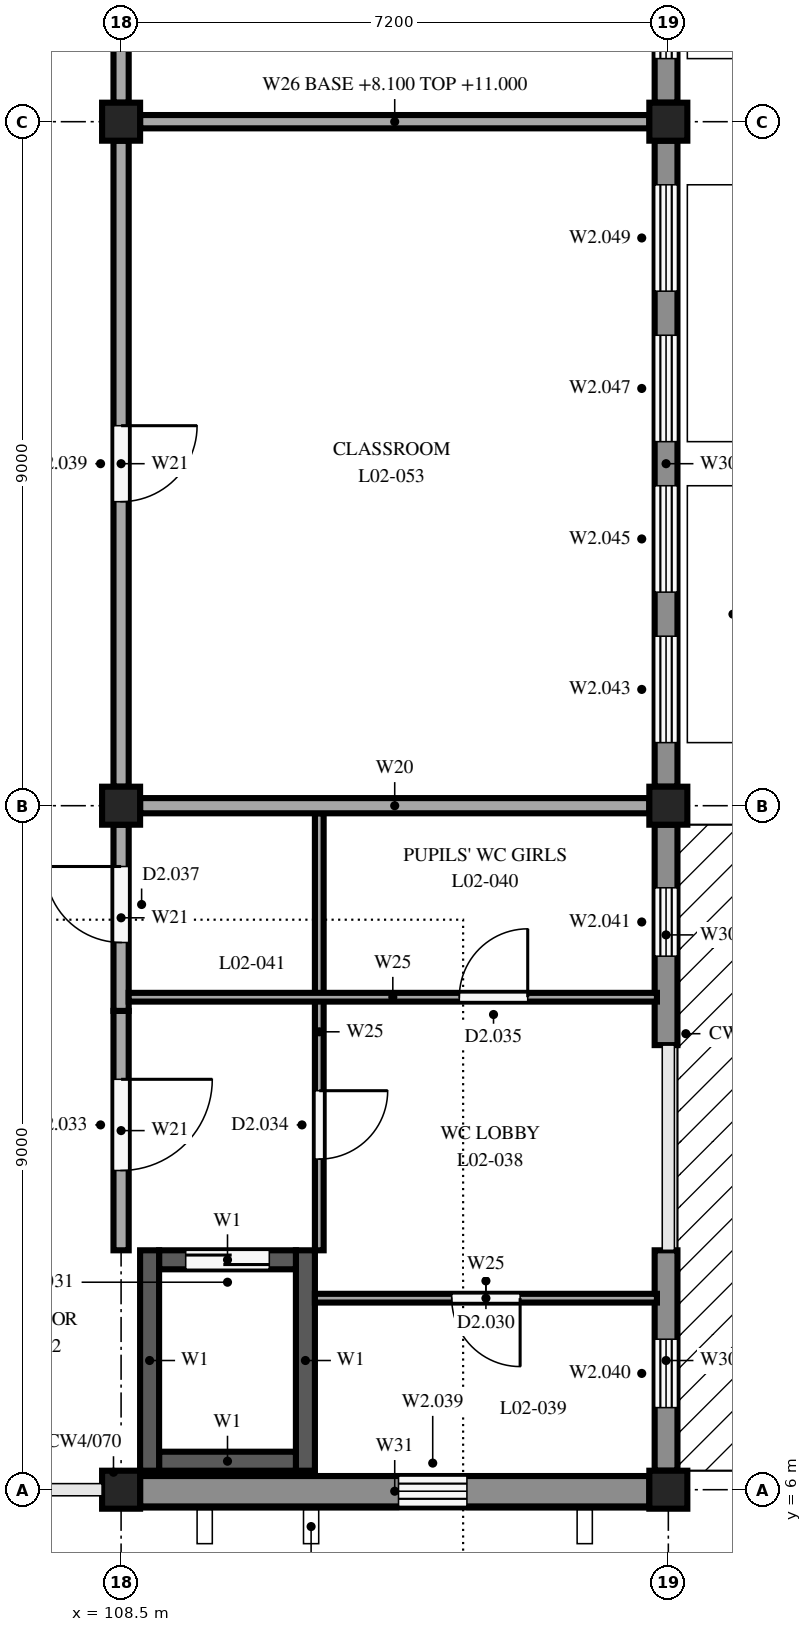
"""IFC4 building model, lengths in metres.
Left out: names, types, materials, properties, quantities, classifications, styles, units other than length and angle.
Written with IfcOpenShell. Run it as: python <this file> out.ifc"""

import sys

from ifc_helpers import new_model, si_unit, direction, frame, frame_2d, origin, origin_2d, place, context, subcontext, project, spatial, rectangle, extrude, element, fill, save


model = new_model("IFC4")
c1 = context("Model", 3, precision=1e-05, world=origin(), true_north=direction((0.0, 1.0)))
c2 = subcontext(c1, "Body", "Model", "MODEL_VIEW")
j1 = project(units=[si_unit("LENGTHUNIT", "METRE"), si_unit("PLANEANGLEUNIT", "RADIAN")], contexts=[c1])
p1 = place(None, origin())
s1 = spatial("IfcSite", under=j1, at=p1, CompositionType="ELEMENT")
p2 = place(p1, origin())
s2 = spatial("IfcBuilding", under=s1, at=p2, CompositionType="ELEMENT")
p3 = place(p2, frame((0.0, 0.0, 8.1)))
s3 = spatial("IfcBuildingStorey", under=s2, at=p3, CompositionType="ELEMENT", Elevation=8.1)
for number, where, z_axis, x_axis in (
    (1, (108.5, 6.0, 0.0), (0.0, 0.0, 1.0), (1.0, 0.0, 0.0)),
    (2, (108.5, 15.0, 0.0), (0.0, 0.0, 1.0), (1.0, 0.0, 0.0)),
    (3, (108.5, 24.0, 0.0), (0.0, 0.0, 1.0), (1.0, 0.0, 0.0)),
    (4, (115.7, 6.0, 0.0), (0.0, 0.0, 1.0), (1.0, 0.0, 0.0)),
    (5, (115.7, 15.0, 0.0), (0.0, 0.0, 1.0), (1.0, 0.0, 0.0)),
    (6, (115.7, 24.0, 0.0), (0.0, 0.0, 1.0), (1.0, 0.0, 0.0)),
):
    element("IfcColumn", number, at=place(p3, frame(where, z_axis=z_axis, x_axis=x_axis)), inside=s3, PredefinedType="COLUMN", context=c2, shape_type="SweptSolid", body=[
        extrude(rectangle(XDim=0.5, YDim=0.5, at=origin_2d()), origin(), (0.0, 0.0, 1.0), 3.35),
    ])
for number, where, z_axis, x_axis in (
    (7, (108.875, 6.25, 0.0), (0.0, 0.0, 1.0), (0.0, 1.0, 0.0)),
    (8, (110.925, 6.25, 0.0), (0.0, 0.0, 1.0), (0.0, 1.0, 0.0)),
):
    element("IfcWall", number, at=place(p3, frame(where, z_axis=z_axis, x_axis=x_axis)), inside=s3, PredefinedType="SHEAR", context=c2, shape_type="SweptSolid", body=[
        extrude(rectangle(XDim=2.9, YDim=0.25, at=frame_2d((1.45, 0.0))), origin(), (0.0, 0.0, 1.0), 3.35),
    ])
p4 = place(p3, frame((109.0, 6.375, 0.0), z_axis=(0.0, 0.0, 1.0), x_axis=(1.0, 0.0, 0.0)))
e9 = element("IfcWall", 9, at=p4, inside=s3, PredefinedType="SHEAR", context=c2, shape_type="SweptSolid", body=[
    extrude(rectangle(XDim=1.8, YDim=0.25, at=frame_2d((0.9, 0.0))), origin(), (0.0, 0.0, 1.0), 3.35),
])
p5 = place(p3, frame((109.0, 9.025, 0.0), z_axis=(0.0, 0.0, 1.0), x_axis=(1.0, 0.0, 0.0)))
e10 = element("IfcWall", 10, at=p5, inside=s3, PredefinedType="SHEAR", context=c2, shape_type="SweptSolid", body=[
    extrude(rectangle(XDim=1.8, YDim=0.25, at=frame_2d((0.9, 0.0))), origin(), (0.0, 0.0, 1.0), 3.35),
])
p6 = place(p5, frame((0.35, 0.0, 0.0)))
e11 = element("IfcOpeningElement", 11, at=p6, cuts=e10, PredefinedType="OPENING", context=c2, shape_type="SweptSolid", body=[
    extrude(rectangle(XDim=1.1, YDim=2.1, at=frame_2d((0.55, 1.05))), frame((0.0, 0.135, 0.0), z_axis=(0.0, -1.0, 0.0), x_axis=(1.0, 0.0, 0.0)), (0.0, 0.0, 1.0), 0.27),
])
p7 = place(p3, frame((115.67, 9.15, 0.0), z_axis=(0.0, 0.0, 1.0), x_axis=(0.0, -1.0, 0.0)))
e12 = element("IfcWall", 12, at=p7, inside=s3, PredefinedType="STANDARD", context=c2, shape_type="SweptSolid", body=[
    extrude(rectangle(XDim=2.9, YDim=0.3, at=frame_2d((1.45, 0.0))), origin(), (0.0, 0.0, 1.0), 2.85),
])
p8 = place(p7, frame((1.17, 0.0, 1.6)))
e13 = element("IfcOpeningElement", 13, at=p8, cuts=e12, PredefinedType="OPENING", context=c2, shape_type="SweptSolid", body=[
    extrude(rectangle(XDim=0.9, YDim=1.0, at=frame_2d((0.45, 0.5))), frame((0.0, 0.16, 0.0), z_axis=(0.0, -1.0, 0.0), x_axis=(1.0, 0.0, 0.0)), (0.0, 0.0, 1.0), 0.32),
])
p9 = place(p3, frame((115.67, 14.75, 0.0), z_axis=(0.0, 0.0, 1.0), x_axis=(0.0, -1.0, 0.0)))
e14 = element("IfcWall", 14, at=p9, inside=s3, PredefinedType="STANDARD", context=c2, shape_type="SweptSolid", body=[
    extrude(rectangle(XDim=2.9, YDim=0.3, at=frame_2d((1.45, 0.0))), origin(), (0.0, 0.0, 1.0), 2.85),
])
p10 = place(p9, frame((0.83, 0.0, 1.6)))
e15 = element("IfcOpeningElement", 15, at=p10, cuts=e14, PredefinedType="OPENING", context=c2, shape_type="SweptSolid", body=[
    extrude(rectangle(XDim=0.9, YDim=1.0, at=frame_2d((0.45, 0.5))), frame((0.0, 0.16, 0.0), z_axis=(0.0, -1.0, 0.0), x_axis=(1.0, 0.0, 0.0)), (0.0, 0.0, 1.0), 0.32),
])
p11 = place(p3, frame((115.67, 23.75, 0.0), z_axis=(0.0, 0.0, 1.0), x_axis=(0.0, -1.0, 0.0)))
e16 = element("IfcWall", 16, at=p11, inside=s3, PredefinedType="STANDARD", context=c2, shape_type="SweptSolid", body=[
    extrude(rectangle(XDim=8.5, YDim=0.3, at=frame_2d((4.25, 0.0))), origin(), (0.0, 0.0, 1.0), 2.85),
])
p12 = place(p11, frame((6.52, 0.0, 0.6)))
e17 = element("IfcOpeningElement", 17, at=p12, cuts=e16, PredefinedType="OPENING", context=c2, shape_type="SweptSolid", body=[
    extrude(rectangle(XDim=1.4, YDim=2.2, at=frame_2d((0.7, 1.1))), frame((0.0, 0.16, 0.0), z_axis=(0.0, -1.0, 0.0), x_axis=(1.0, 0.0, 0.0)), (0.0, 0.0, 1.0), 0.32),
])
p13 = place(p11, frame((4.54, 0.0, 0.6)))
e18 = element("IfcOpeningElement", 18, at=p13, cuts=e16, PredefinedType="OPENING", context=c2, shape_type="SweptSolid", body=[
    extrude(rectangle(XDim=1.4, YDim=2.2, at=frame_2d((0.7, 1.1))), frame((0.0, 0.16, 0.0), z_axis=(0.0, -1.0, 0.0), x_axis=(1.0, 0.0, 0.0)), (0.0, 0.0, 1.0), 0.32),
])
p14 = place(p11, frame((2.56, 0.0, 0.6)))
e19 = element("IfcOpeningElement", 19, at=p14, cuts=e16, PredefinedType="OPENING", context=c2, shape_type="SweptSolid", body=[
    extrude(rectangle(XDim=1.4, YDim=2.2, at=frame_2d((0.7, 1.1))), frame((0.0, 0.16, 0.0), z_axis=(0.0, -1.0, 0.0), x_axis=(1.0, 0.0, 0.0)), (0.0, 0.0, 1.0), 0.32),
])
p15 = place(p11, frame((0.58, 0.0, 0.6)))
e20 = element("IfcOpeningElement", 20, at=p15, cuts=e16, PredefinedType="OPENING", context=c2, shape_type="SweptSolid", body=[
    extrude(rectangle(XDim=1.4, YDim=2.2, at=frame_2d((0.7, 1.1))), frame((0.0, 0.16, 0.0), z_axis=(0.0, -1.0, 0.0), x_axis=(1.0, 0.0, 0.0)), (0.0, 0.0, 1.0), 0.32),
])
p16 = place(p3, frame((115.67, 32.75, 0.0), z_axis=(0.0, 0.0, 1.0), x_axis=(0.0, -1.0, 0.0)))
e21 = element("IfcWall", 21, at=p16, inside=s3, PredefinedType="STANDARD", context=c2, shape_type="SweptSolid", body=[
    extrude(rectangle(XDim=8.5, YDim=0.3, at=frame_2d((4.25, 0.0))), origin(), (0.0, 0.0, 1.0), 2.85),
])
p17 = place(p16, frame((6.52, 0.0, 0.6)))
e22 = element("IfcOpeningElement", 22, at=p17, cuts=e21, PredefinedType="OPENING", context=c2, shape_type="SweptSolid", body=[
    extrude(rectangle(XDim=1.4, YDim=2.2, at=frame_2d((0.7, 1.1))), frame((0.0, 0.16, 0.0), z_axis=(0.0, -1.0, 0.0), x_axis=(1.0, 0.0, 0.0)), (0.0, 0.0, 1.0), 0.32),
])
p18 = place(p16, frame((4.54, 0.0, 0.6)))
e23 = element("IfcOpeningElement", 23, at=p18, cuts=e21, PredefinedType="OPENING", context=c2, shape_type="SweptSolid", body=[
    extrude(rectangle(XDim=1.4, YDim=2.2, at=frame_2d((0.7, 1.1))), frame((0.0, 0.16, 0.0), z_axis=(0.0, -1.0, 0.0), x_axis=(1.0, 0.0, 0.0)), (0.0, 0.0, 1.0), 0.32),
])
p19 = place(p16, frame((2.56, 0.0, 0.6)))
e24 = element("IfcOpeningElement", 24, at=p19, cuts=e21, PredefinedType="OPENING", context=c2, shape_type="SweptSolid", body=[
    extrude(rectangle(XDim=1.4, YDim=2.2, at=frame_2d((0.7, 1.1))), frame((0.0, 0.16, 0.0), z_axis=(0.0, -1.0, 0.0), x_axis=(1.0, 0.0, 0.0)), (0.0, 0.0, 1.0), 0.32),
])
p20 = place(p16, frame((0.58, 0.0, 0.6)))
e25 = element("IfcOpeningElement", 25, at=p20, cuts=e21, PredefinedType="OPENING", context=c2, shape_type="SweptSolid", body=[
    extrude(rectangle(XDim=1.4, YDim=2.2, at=frame_2d((0.7, 1.1))), frame((0.0, 0.16, 0.0), z_axis=(0.0, -1.0, 0.0), x_axis=(1.0, 0.0, 0.0)), (0.0, 0.0, 1.0), 0.32),
])
p21 = place(p3, frame((115.45, 5.98, 0.0), z_axis=(0.0, 0.0, 1.0), x_axis=(-1.0, 0.0, 0.0)))
e26 = element("IfcWall", 26, at=p21, inside=s3, PredefinedType="STANDARD", context=c2, shape_type="SweptSolid", body=[
    extrude(rectangle(XDim=6.7, YDim=0.4, at=frame_2d((3.35, 0.0))), origin(), (0.0, 0.0, 1.0), 2.9),
])
p22 = place(p21, frame((2.4, 0.0, 1.6)))
e27 = element("IfcOpeningElement", 27, at=p22, cuts=e26, PredefinedType="OPENING", context=c2, shape_type="SweptSolid", body=[
    extrude(rectangle(XDim=0.9, YDim=1.0, at=frame_2d((0.45, 0.5))), frame((0.0, 0.21, 0.0), z_axis=(0.0, -1.0, 0.0), x_axis=(1.0, 0.0, 0.0)), (0.0, 0.0, 1.0), 0.42),
])
p23 = place(p3, frame((108.5, 12.3, 0.0), z_axis=(0.0, 0.0, 1.0), x_axis=(0.0, -1.0, 0.0)))
e28 = element("IfcWall", 28, at=p23, inside=s3, PredefinedType="PARTITIONING", context=c2, shape_type="SweptSolid", body=[
    extrude(rectangle(XDim=3.15, YDim=0.2, at=frame_2d((1.575, 0.0))), origin(), (0.0, 0.0, 1.0), 2.9),
])
p24 = place(p23, frame((0.9, 0.0, 0.0)))
e29 = element("IfcOpeningElement", 29, at=p24, cuts=e28, PredefinedType="OPENING", context=c2, shape_type="SweptSolid", body=[
    extrude(rectangle(XDim=1.2, YDim=2.1, at=frame_2d((0.6, 1.05))), frame((0.0, 0.11, 0.0), z_axis=(0.0, -1.0, 0.0), x_axis=(1.0, 0.0, 0.0)), (0.0, 0.0, 1.0), 0.22),
])
p25 = place(p3, frame((108.5, 12.3, 0.0), z_axis=(0.0, 0.0, 1.0), x_axis=(0.0, 1.0, 0.0)))
e30 = element("IfcWall", 30, at=p25, inside=s3, PredefinedType="PARTITIONING", context=c2, shape_type="SweptSolid", body=[
    extrude(rectangle(XDim=2.45, YDim=0.2, at=frame_2d((1.225, 0.0))), origin(), (0.0, 0.0, 1.0), 2.9),
])
p26 = place(p25, frame((0.9, 0.0, 0.0)))
e31 = element("IfcOpeningElement", 31, at=p26, cuts=e30, PredefinedType="OPENING", context=c2, shape_type="SweptSolid", body=[
    extrude(rectangle(XDim=1.0, YDim=2.1, at=frame_2d((0.5, 1.05))), frame((0.0, 0.11, 0.0), z_axis=(0.0, -1.0, 0.0), x_axis=(1.0, 0.0, 0.0)), (0.0, 0.0, 1.0), 0.22),
])
p27 = place(p3, frame((108.75, 15.0, 0.0), z_axis=(0.0, 0.0, 1.0), x_axis=(1.0, 0.0, 0.0)))
e32 = element("IfcWall", 32, at=p27, inside=s3, PredefinedType="PARTITIONING", context=c2, shape_type="SweptSolid", body=[
    extrude(rectangle(XDim=6.7, YDim=0.2, at=frame_2d((3.35, 0.0))), origin(), (0.0, 0.0, 1.0), 2.9),
])
p28 = place(p3, frame((111.107, 14.9, 0.0), z_axis=(0.0, 0.0, 1.0), x_axis=(0.0, -1.0, 0.0)))
e33 = element("IfcWall", 33, at=p28, inside=s3, PredefinedType="PARTITIONING", context=c2, shape_type="SweptSolid", body=[
    extrude(rectangle(XDim=5.75, YDim=0.115, at=frame_2d((2.875, 0.0))), origin(), (0.0, 0.0, 1.0), 3.35),
])
p29 = place(p28, frame((3.65, 0.0, 0.0)))
e34 = element("IfcOpeningElement", 34, at=p29, cuts=e33, PredefinedType="OPENING", context=c2, shape_type="SweptSolid", body=[
    extrude(rectangle(XDim=0.9, YDim=2.1, at=frame_2d((0.45, 1.05))), frame((0.0, 0.067, 0.0), z_axis=(0.0, -1.0, 0.0), x_axis=(1.0, 0.0, 0.0)), (0.0, 0.0, 1.0), 0.135),
])
p30 = place(p3, frame((115.55, 8.52, 0.0), z_axis=(0.0, 0.0, 1.0), x_axis=(-1.0, 0.0, 0.0)))
e35 = element("IfcWall", 35, at=p30, inside=s3, PredefinedType="PARTITIONING", context=c2, shape_type="SweptSolid", body=[
    extrude(rectangle(XDim=4.5, YDim=0.115, at=frame_2d((2.25, 0.0))), origin(), (0.0, 0.0, 1.0), 3.35),
])
p31 = place(p30, frame((1.8, 0.0, 0.0)))
e36 = element("IfcOpeningElement", 36, at=p31, cuts=e35, PredefinedType="OPENING", context=c2, shape_type="SweptSolid", body=[
    extrude(rectangle(XDim=0.9, YDim=2.1, at=frame_2d((0.45, 1.05))), frame((0.0, 0.067, 0.0), z_axis=(0.0, -1.0, 0.0), x_axis=(1.0, 0.0, 0.0)), (0.0, 0.0, 1.0), 0.135),
])
p32 = place(p3, frame((108.6, 12.48, 0.0), z_axis=(0.0, 0.0, 1.0), x_axis=(1.0, 0.0, 0.0)))
e37 = element("IfcWall", 37, at=p32, inside=s3, PredefinedType="PARTITIONING", context=c2, shape_type="SweptSolid", body=[
    extrude(rectangle(XDim=6.95, YDim=0.115, at=frame_2d((3.475, 0.0))), origin(), (0.0, 0.0, 1.0), 3.35),
])
p33 = place(p32, frame((4.35, 0.0, 0.0)))
e38 = element("IfcOpeningElement", 38, at=p33, cuts=e37, PredefinedType="OPENING", context=c2, shape_type="SweptSolid", body=[
    extrude(rectangle(XDim=0.9, YDim=2.1, at=frame_2d((0.45, 1.05))), frame((0.0, 0.067, 0.0), z_axis=(0.0, -1.0, 0.0), x_axis=(1.0, 0.0, 0.0)), (0.0, 0.0, 1.0), 0.135),
])
p34 = place(p3, frame((108.5, 23.75, 0.0), z_axis=(0.0, 0.0, 1.0), x_axis=(0.0, -1.0, 0.0)))
e39 = element("IfcWall", 39, at=p34, inside=s3, PredefinedType="PARTITIONING", context=c2, shape_type="SweptSolid", body=[
    extrude(rectangle(XDim=8.5, YDim=0.2, at=frame_2d((4.25, 0.0))), origin(), (0.0, 0.0, 1.0), 2.9),
])
p35 = place(p34, frame((3.75, 0.0, 0.0)))
e40 = element("IfcOpeningElement", 40, at=p35, cuts=e39, PredefinedType="OPENING", context=c2, shape_type="SweptSolid", body=[
    extrude(rectangle(XDim=1.0, YDim=2.1, at=frame_2d((0.5, 1.05))), frame((0.0, 0.11, 0.0), z_axis=(0.0, -1.0, 0.0), x_axis=(1.0, 0.0, 0.0)), (0.0, 0.0, 1.0), 0.22),
])
p36 = place(p3, frame((108.5, 32.75, 0.0), z_axis=(0.0, 0.0, 1.0), x_axis=(0.0, -1.0, 0.0)))
e41 = element("IfcWall", 41, at=p36, inside=s3, PredefinedType="PARTITIONING", context=c2, shape_type="SweptSolid", body=[
    extrude(rectangle(XDim=8.5, YDim=0.2, at=frame_2d((4.25, 0.0))), origin(), (0.0, 0.0, 1.0), 2.9),
])
p37 = place(p36, frame((3.75, 0.0, 0.0)))
e42 = element("IfcOpeningElement", 42, at=p37, cuts=e41, PredefinedType="OPENING", context=c2, shape_type="SweptSolid", body=[
    extrude(rectangle(XDim=1.0, YDim=2.1, at=frame_2d((0.5, 1.05))), frame((0.0, 0.11, 0.0), z_axis=(0.0, -1.0, 0.0), x_axis=(1.0, 0.0, 0.0)), (0.0, 0.0, 1.0), 0.22),
])
p38 = place(p3, frame((108.75, 24.0, 0.0), z_axis=(0.0, 0.0, 1.0), x_axis=(1.0, 0.0, 0.0)))
e43 = element("IfcWall", 43, at=p38, inside=s3, PredefinedType="PARTITIONING", context=c2, shape_type="SweptSolid", body=[
    extrude(rectangle(XDim=6.7, YDim=0.175, at=frame_2d((3.35, 0.0))), origin(), (0.0, 0.0, 1.0), 2.9),
])
p39 = place(p8, origin())
e44 = element("IfcWindow", 44, at=p39, inside=s3, PartitioningType="SINGLE_PANEL", PredefinedType="WINDOW", context=c2, shape_type="SweptSolid", body=[
    extrude(rectangle(XDim=0.9, YDim=1.0, at=frame_2d((0.45, 0.5))), frame((0.0, 0.03, 0.0), z_axis=(0.0, -1.0, 0.0), x_axis=(1.0, 0.0, 0.0)), (0.0, 0.0, 1.0), 0.06),
])
fill(e13, e44)
p40 = place(p10, origin())
e45 = element("IfcWindow", 45, at=p40, inside=s3, PartitioningType="SINGLE_PANEL", PredefinedType="WINDOW", context=c2, shape_type="SweptSolid", body=[
    extrude(rectangle(XDim=0.9, YDim=1.0, at=frame_2d((0.45, 0.5))), frame((0.0, 0.03, 0.0), z_axis=(0.0, -1.0, 0.0), x_axis=(1.0, 0.0, 0.0)), (0.0, 0.0, 1.0), 0.06),
])
fill(e15, e45)
p41 = place(p12, origin())
e46 = element("IfcWindow", 46, at=p41, inside=s3, PartitioningType="DOUBLE_PANEL_VERTICAL", PredefinedType="WINDOW", context=c2, shape_type="SweptSolid", body=[
    extrude(rectangle(XDim=1.4, YDim=2.2, at=frame_2d((0.7, 1.1))), frame((0.0, 0.03, 0.0), z_axis=(0.0, -1.0, 0.0), x_axis=(1.0, 0.0, 0.0)), (0.0, 0.0, 1.0), 0.06),
])
fill(e17, e46)
p42 = place(p13, origin())
e47 = element("IfcWindow", 47, at=p42, inside=s3, PartitioningType="DOUBLE_PANEL_VERTICAL", PredefinedType="WINDOW", context=c2, shape_type="SweptSolid", body=[
    extrude(rectangle(XDim=1.4, YDim=2.2, at=frame_2d((0.7, 1.1))), frame((0.0, 0.03, 0.0), z_axis=(0.0, -1.0, 0.0), x_axis=(1.0, 0.0, 0.0)), (0.0, 0.0, 1.0), 0.06),
])
fill(e18, e47)
p43 = place(p14, origin())
e48 = element("IfcWindow", 48, at=p43, inside=s3, PartitioningType="DOUBLE_PANEL_VERTICAL", PredefinedType="WINDOW", context=c2, shape_type="SweptSolid", body=[
    extrude(rectangle(XDim=1.4, YDim=2.2, at=frame_2d((0.7, 1.1))), frame((0.0, 0.03, 0.0), z_axis=(0.0, -1.0, 0.0), x_axis=(1.0, 0.0, 0.0)), (0.0, 0.0, 1.0), 0.06),
])
fill(e19, e48)
p44 = place(p15, origin())
e49 = element("IfcWindow", 49, at=p44, inside=s3, PartitioningType="DOUBLE_PANEL_VERTICAL", PredefinedType="WINDOW", context=c2, shape_type="SweptSolid", body=[
    extrude(rectangle(XDim=1.4, YDim=2.2, at=frame_2d((0.7, 1.1))), frame((0.0, 0.03, 0.0), z_axis=(0.0, -1.0, 0.0), x_axis=(1.0, 0.0, 0.0)), (0.0, 0.0, 1.0), 0.06),
])
fill(e20, e49)
p45 = place(p17, origin())
e50 = element("IfcWindow", 50, at=p45, inside=s3, PartitioningType="DOUBLE_PANEL_VERTICAL", PredefinedType="WINDOW", context=c2, shape_type="SweptSolid", body=[
    extrude(rectangle(XDim=1.4, YDim=2.2, at=frame_2d((0.7, 1.1))), frame((0.0, 0.03, 0.0), z_axis=(0.0, -1.0, 0.0), x_axis=(1.0, 0.0, 0.0)), (0.0, 0.0, 1.0), 0.06),
])
fill(e22, e50)
p46 = place(p22, origin())
e51 = element("IfcWindow", 51, at=p46, inside=s3, PartitioningType="SINGLE_PANEL", PredefinedType="WINDOW", context=c2, shape_type="SweptSolid", body=[
    extrude(rectangle(XDim=0.9, YDim=1.0, at=frame_2d((0.45, 0.5))), frame((0.0, 0.03, 0.0), z_axis=(0.0, -1.0, 0.0), x_axis=(1.0, 0.0, 0.0)), (0.0, 0.0, 1.0), 0.06),
])
fill(e27, e51)
p47 = place(p24, origin())
e52 = element("IfcDoor", 52, at=p47, inside=s3, OperationType="SINGLE_SWING_LEFT", PredefinedType="DOOR", context=c2, shape_type="SweptSolid", body=[
    extrude(rectangle(XDim=1.2, YDim=2.1, at=frame_2d((0.6, 1.05))), frame((0.0, 0.025, 0.0), z_axis=(0.0, -1.0, 0.0), x_axis=(1.0, 0.0, 0.0)), (0.0, 0.0, 1.0), 0.05),
])
fill(e29, e52)
p48 = place(p26, origin())
e53 = element("IfcDoor", 53, at=p48, inside=s3, OperationType="SINGLE_SWING_RIGHT", PredefinedType="DOOR", context=c2, shape_type="SweptSolid", body=[
    extrude(rectangle(XDim=1.0, YDim=2.1, at=frame_2d((0.5, 1.05))), frame((0.0, 0.025, 0.0), z_axis=(0.0, -1.0, 0.0), x_axis=(1.0, 0.0, 0.0)), (0.0, 0.0, 1.0), 0.05),
])
fill(e31, e53)
p49 = place(p29, origin())
e54 = element("IfcDoor", 54, at=p49, inside=s3, OperationType="SINGLE_SWING_LEFT", PredefinedType="DOOR", context=c2, shape_type="SweptSolid", body=[
    extrude(rectangle(XDim=0.9, YDim=2.1, at=frame_2d((0.45, 1.05))), frame((0.0, 0.025, 0.0), z_axis=(0.0, -1.0, 0.0), x_axis=(1.0, 0.0, 0.0)), (0.0, 0.0, 1.0), 0.05),
])
fill(e34, e54)
p50 = place(p31, origin())
e55 = element("IfcDoor", 55, at=p50, inside=s3, OperationType="SINGLE_SWING_LEFT", PredefinedType="DOOR", context=c2, shape_type="SweptSolid", body=[
    extrude(rectangle(XDim=0.9, YDim=2.1, at=frame_2d((0.45, 1.05))), frame((0.0, 0.025, 0.0), z_axis=(0.0, -1.0, 0.0), x_axis=(1.0, 0.0, 0.0)), (0.0, 0.0, 1.0), 0.05),
])
fill(e36, e55)
p51 = place(p33, origin())
e56 = element("IfcDoor", 56, at=p51, inside=s3, OperationType="SINGLE_SWING_RIGHT", PredefinedType="DOOR", context=c2, shape_type="SweptSolid", body=[
    extrude(rectangle(XDim=0.9, YDim=2.1, at=frame_2d((0.45, 1.05))), frame((0.0, 0.025, 0.0), z_axis=(0.0, -1.0, 0.0), x_axis=(1.0, 0.0, 0.0)), (0.0, 0.0, 1.0), 0.05),
])
fill(e38, e56)
p52 = place(p35, origin())
e57 = element("IfcDoor", 57, at=p52, inside=s3, OperationType="SINGLE_SWING_LEFT", PredefinedType="DOOR", context=c2, shape_type="SweptSolid", body=[
    extrude(rectangle(XDim=1.0, YDim=2.1, at=frame_2d((0.5, 1.05))), frame((0.0, 0.025, 0.0), z_axis=(0.0, -1.0, 0.0), x_axis=(1.0, 0.0, 0.0)), (0.0, 0.0, 1.0), 0.05),
])
fill(e40, e57)
p53 = place(p6, origin())
e58 = element("IfcDoor", 58, at=p53, inside=s3, OperationType="SLIDING_TO_LEFT", PredefinedType="DOOR", context=c2, shape_type="SweptSolid", body=[
    extrude(rectangle(XDim=1.1, YDim=2.1, at=frame_2d((0.55, 1.05))), frame((0.0, 0.025, 0.0), z_axis=(0.0, -1.0, 0.0), x_axis=(1.0, 0.0, 0.0)), (0.0, 0.0, 1.0), 0.05),
])
fill(e11, e58)
save(model, sys.argv[1])
